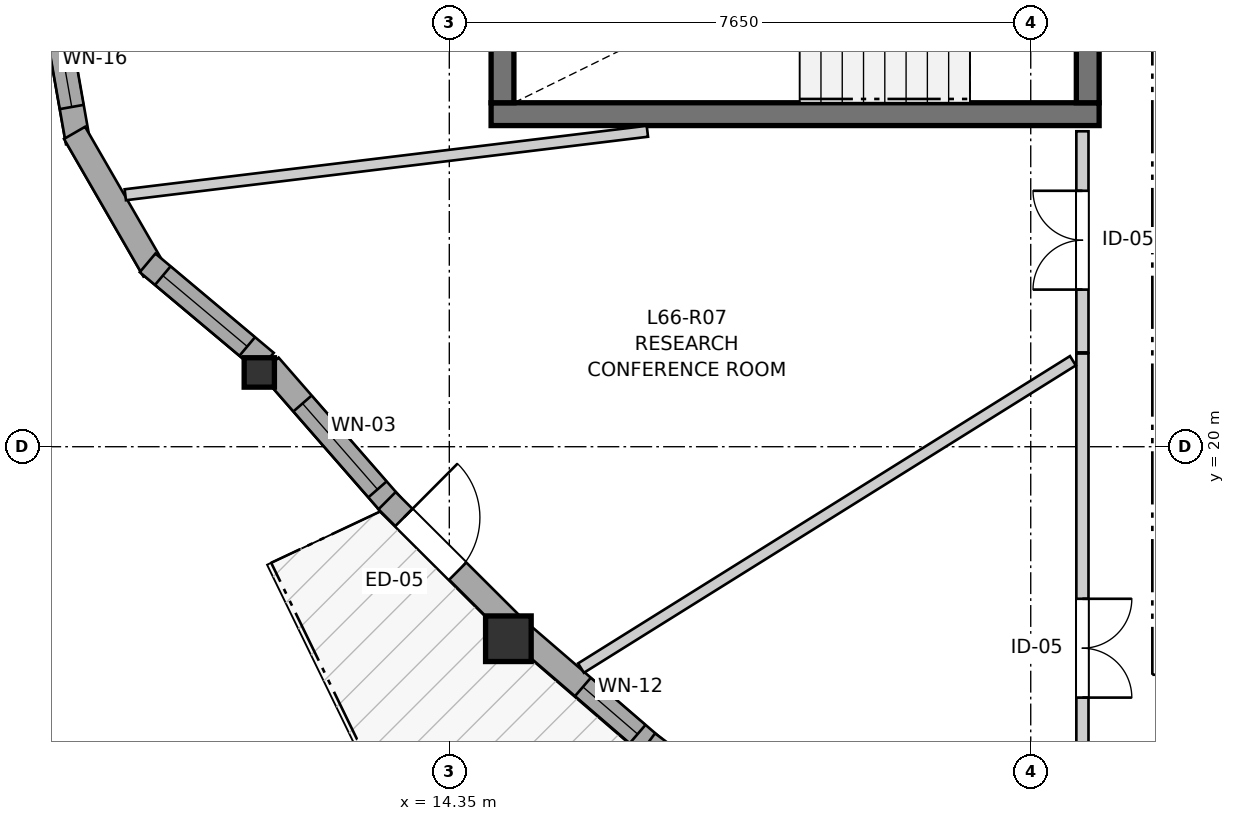
"""IFC4 building model, lengths in metres.
Left out: names, types, materials, properties, quantities, classifications, styles, units other than length and angle.
Written with IfcOpenShell. Run it as: python <this file> out.ifc"""

import sys

from ifc_helpers import new_model, si_unit, direction, frame, frame_2d, origin, origin_2d, place, context, subcontext, project, spatial, rectangle, i_section, extrude, source, transform, mapped, element, fill, save


model = new_model("IFC4")
c1 = context("Model", 3, precision=1e-05, world=origin(), true_north=direction((0.0, 1.0)))
c2 = subcontext(c1, "Body", "Model", "MODEL_VIEW")
j1 = project(units=[si_unit("LENGTHUNIT", "METRE"), si_unit("PLANEANGLEUNIT", "RADIAN")], contexts=[c1])
p1 = place(None, origin())
s1 = spatial("IfcSite", under=j1, at=p1, CompositionType="ELEMENT")
p2 = place(p1, origin())
s2 = spatial("IfcBuilding", under=s1, at=p2, CompositionType="ELEMENT")
p3 = place(p2, frame((0.0, 0.0, 221.2)))
s3 = spatial("IfcBuildingStorey", under=s2, at=p3, CompositionType="ELEMENT", Elevation=221.2)
p4 = place(p3, frame((14.9, 24.375, 0.0), z_axis=(0.0, 0.0, 1.0), x_axis=(1.0, 0.0, 0.0)))
e1 = element("IfcWall", 1, at=p4, inside=s3, PredefinedType="SHEAR", context=c2, shape_type="SweptSolid", body=[
    extrude(rectangle(XDim=8.0, YDim=0.3, at=frame_2d((4.0, 0.0))), origin(), (0.0, 0.0, 1.0), 2.96),
])
p5 = place(p3, frame((15.05, 27.475, 0.0), z_axis=(0.0, 0.0, 1.0), x_axis=(0.0, -1.0, 0.0)))
e2 = element("IfcWall", 2, at=p5, inside=s3, PredefinedType="SHEAR", context=c2, shape_type="SweptSolid", body=[
    extrude(rectangle(XDim=2.95, YDim=0.3, at=frame_2d((1.475, 0.0))), origin(), (0.0, 0.0, 1.0), 2.96),
])
p6 = place(p3, frame((22.75, 24.525, 0.0), z_axis=(0.0, 0.0, 1.0), x_axis=(0.0, 1.0, 0.0)))
e3 = element("IfcWall", 3, at=p6, inside=s3, PredefinedType="SHEAR", context=c2, shape_type="SweptSolid", body=[
    extrude(rectangle(XDim=2.95, YDim=0.3, at=frame_2d((1.475, 0.0))), origin(), (0.0, 0.0, 1.0), 2.96),
])
p7 = place(p6, frame((0.985, 0.0, 0.0)))
e4 = element("IfcOpeningElement", 4, at=p7, cuts=e3, PredefinedType="OPENING", context=c2, shape_type="SweptSolid", body=[
    extrude(rectangle(XDim=0.98, YDim=2.15, at=frame_2d((0.49, 1.075))), frame((0.0, 0.16, 0.0), z_axis=(0.0, -1.0, 0.0), x_axis=(1.0, 0.0, 0.0)), (0.0, 0.0, 1.0), 0.32),
])
m1 = source(origin(), c2, "Body", "SweptSolid", [
    extrude(i_section(OverallWidth=0.398, OverallDepth=0.387, WebThickness=0.019, FlangeThickness=0.03, FilletRadius=0.015, at=origin_2d()), origin(), (0.0, 0.0, 1.0), 2.96),
])
p8 = place(p3, frame((11.85, 20.977, 0.0), z_axis=(0.0, 0.0, 1.0), x_axis=(1.0, 0.0, 0.0)))
e5 = element("IfcColumn", 5, at=p8, inside=s3, PredefinedType="PILASTER", context=c2, shape_type="MappedRepresentation", body=[
    mapped(m1, transform((0.0, 0.0, 0.0), x_axis=(1.0, 0.0, 0.0), y_axis=(0.0, 1.0, 0.0), z_axis=(0.0, 0.0, 1.0), scale=1.0)),
])
m2 = source(origin(), c2, "Body", "SweptSolid", [
    extrude(rectangle(XDim=0.6, YDim=0.6, at=origin_2d()), origin(), (0.0, 0.0, 1.0), 2.96),
])
p9 = place(p3, frame((15.127, 17.474, 0.0), z_axis=(0.0, 0.0, 1.0), x_axis=(1.0, 0.0, 0.0)))
e6 = element("IfcColumn", 6, at=p9, inside=s3, PredefinedType="COLUMN", context=c2, shape_type="MappedRepresentation", body=[
    mapped(m2, transform((0.0, 0.0, 0.0), x_axis=(1.0, 0.0, 0.0), y_axis=(0.0, 1.0, 0.0), z_axis=(0.0, 0.0, 1.0), scale=1.0)),
])
p10 = place(p3, frame((9.101, 26.065, 0.0), z_axis=(0.0, 0.0, 1.0), x_axis=(0.173672066494, -0.984803540469, 0.0)))
e7 = element("IfcWall", 7, at=p10, inside=s3, PredefinedType="SOLIDWALL", context=c2, shape_type="SweptSolid", body=[
    extrude(rectangle(XDim=2.09, YDim=0.32, at=frame_2d((1.045, 0.0))), origin(), (0.0, 0.0, 1.0), 2.58),
])
p11 = place(p10, frame((0.47, 0.0, 0.82)))
e8 = element("IfcOpeningElement", 8, at=p11, cuts=e7, PredefinedType="OPENING", context=c2, shape_type="SweptSolid", body=[
    extrude(rectangle(XDim=1.15, YDim=1.2, at=frame_2d((0.575, 0.6))), frame((0.0, 0.17, 0.0), z_axis=(0.0, -1.0, 0.0), x_axis=(1.0, 0.0, 0.0)), (0.0, 0.0, 1.0), 0.34),
])
p12 = place(p3, frame((9.419, 24.129, 0.0), z_axis=(0.0, 0.0, 1.0), x_axis=(0.499995423472, -0.866028046028, 0.0)))
e9 = element("IfcWall", 9, at=p12, inside=s3, PredefinedType="SOLIDWALL", context=c2, shape_type="SweptSolid", body=[
    extrude(rectangle(XDim=2.09, YDim=0.32, at=frame_2d((1.045, 0.0))), origin(), (0.0, 0.0, 1.0), 2.58),
])
p13 = place(p3, frame((10.381, 22.419, 0.0), z_axis=(0.0, 0.0, 1.0), x_axis=(0.766099948115, -0.642721455608, 0.0)))
e10 = element("IfcWall", 10, at=p13, inside=s3, PredefinedType="SOLIDWALL", context=c2, shape_type="SweptSolid", body=[
    extrude(rectangle(XDim=2.032, YDim=0.32, at=frame_2d((1.016, 0.0))), origin(), (0.0, 0.0, 1.0), 2.58),
])
p14 = place(p13, frame((0.261, 0.0, 0.82)))
e11 = element("IfcOpeningElement", 11, at=p14, cuts=e10, PredefinedType="OPENING", context=c2, shape_type="SweptSolid", body=[
    extrude(rectangle(XDim=1.45, YDim=1.25, at=frame_2d((0.725, 0.625))), frame((0.0, 0.17, 0.0), z_axis=(0.0, -1.0, 0.0), x_axis=(1.0, 0.0, 0.0)), (0.0, 0.0, 1.0), 0.34),
])
p15 = place(p3, frame((11.984, 21.067, 0.0), z_axis=(0.0, 0.0, 1.0), x_axis=(0.657577552216, -0.753386861328, 0.0)))
e12 = element("IfcWall", 12, at=p15, inside=s3, PredefinedType="SOLIDWALL", context=c2, shape_type="SweptSolid", body=[
    extrude(rectangle(XDim=2.444, YDim=0.32, at=frame_2d((1.222, 0.0))), origin(), (0.0, 0.0, 1.0), 2.58),
])
p16 = place(p15, frame((0.662, 0.0, 0.82)))
e13 = element("IfcOpeningElement", 13, at=p16, cuts=e12, PredefinedType="OPENING", context=c2, shape_type="SweptSolid", body=[
    extrude(rectangle(XDim=1.5, YDim=1.45, at=frame_2d((0.75, 0.725))), frame((0.0, 0.17, 0.0), z_axis=(0.0, -1.0, 0.0), x_axis=(1.0, 0.0, 0.0)), (0.0, 0.0, 1.0), 0.34),
])
p17 = place(p3, frame((13.531, 19.29, 0.0), z_axis=(0.0, 0.0, 1.0), x_axis=(0.708419394795, -0.705791726417, 0.0)))
e14 = element("IfcWall", 14, at=p17, inside=s3, PredefinedType="SOLIDWALL", context=c2, shape_type="SweptSolid", body=[
    extrude(rectangle(XDim=2.323, YDim=0.32, at=frame_2d((1.161, 0.0))), origin(), (0.0, 0.0, 1.0), 2.58),
])
p18 = place(p17, frame((0.313, 0.0, 0.0)))
e15 = element("IfcOpeningElement", 15, at=p18, cuts=e14, PredefinedType="OPENING", context=c2, shape_type="SweptSolid", body=[
    extrude(rectangle(XDim=1.0, YDim=2.1, at=frame_2d((0.5, 1.05))), frame((0.0, 0.17, 0.0), z_axis=(0.0, -1.0, 0.0), x_axis=(1.0, 0.0, 0.0)), (0.0, 0.0, 1.0), 0.34),
])
p19 = place(p3, frame((15.3, 17.536, 0.0), z_axis=(0.0, 0.0, 1.0), x_axis=(0.757488333031, -0.652848700177, 0.0)))
e16 = element("IfcWall", 16, at=p19, inside=s3, PredefinedType="SOLIDWALL", context=c2, shape_type="SweptSolid", body=[
    extrude(rectangle(XDim=2.284, YDim=0.32, at=frame_2d((1.142, 0.0))), origin(), (0.0, 0.0, 1.0), 2.58),
])
p20 = place(p19, frame((1.067, 0.0, 0.82)))
e17 = element("IfcOpeningElement", 17, at=p20, cuts=e16, PredefinedType="OPENING", context=c2, shape_type="SweptSolid", body=[
    extrude(rectangle(XDim=0.95, YDim=1.35, at=frame_2d((0.475, 0.675))), frame((0.0, 0.17, 0.0), z_axis=(0.0, -1.0, 0.0), x_axis=(1.0, 0.0, 0.0)), (0.0, 0.0, 1.0), 0.34),
])
p21 = place(p3, frame((16.961, 16.1, 0.0), z_axis=(0.0, 0.0, 1.0), x_axis=(0.803809802043, -0.594886377504, 0.0)))
e18 = element("IfcWall", 18, at=p21, inside=s3, PredefinedType="SOLIDWALL", context=c2, shape_type="SweptSolid", body=[
    extrude(rectangle(XDim=2.328, YDim=0.32, at=frame_2d((1.164, 0.0))), origin(), (0.0, 0.0, 1.0), 2.58),
])
p22 = place(p21, frame((0.649, 0.0, 0.82)))
e19 = element("IfcOpeningElement", 19, at=p22, cuts=e18, PredefinedType="OPENING", context=c2, shape_type="SweptSolid", body=[
    extrude(rectangle(XDim=1.05, YDim=1.45, at=frame_2d((0.525, 0.725))), frame((0.0, 0.17, 0.0), z_axis=(0.0, -1.0, 0.0), x_axis=(1.0, 0.0, 0.0)), (0.0, 0.0, 1.0), 0.34),
])
p23 = place(p3, frame((22.68, 21.226, 0.0), z_axis=(0.0, 0.0, 1.0), x_axis=(0.0, -1.0, 0.0)))
e20 = element("IfcWall", 20, at=p23, inside=s3, PredefinedType="PARTITIONING", context=c2, shape_type="SweptSolid", body=[
    extrude(rectangle(XDim=5.348, YDim=0.16, at=frame_2d((2.674, 0.0))), origin(), (0.0, 0.0, 1.0), 2.96),
])
p24 = place(p23, frame((3.227, 0.0, 0.0)))
e21 = element("IfcOpeningElement", 21, at=p24, cuts=e20, PredefinedType="OPENING", context=c2, shape_type="SweptSolid", body=[
    extrude(rectangle(XDim=1.3, YDim=2.1, at=frame_2d((0.65, 1.05))), frame((0.0, 0.09, 0.0), z_axis=(0.0, -1.0, 0.0), x_axis=(1.0, 0.0, 0.0)), (0.0, 0.0, 1.0), 0.18),
])
p25 = place(p3, frame((22.68, 21.241, 0.0), z_axis=(0.0, 0.0, 1.0), x_axis=(0.0, 1.0, 0.0)))
e22 = element("IfcWall", 22, at=p25, inside=s3, PredefinedType="PARTITIONING", context=c2, shape_type="SweptSolid", body=[
    extrude(rectangle(XDim=2.909, YDim=0.16, at=frame_2d((1.455, 0.0))), origin(), (0.0, 0.0, 1.0), 2.96),
])
p26 = place(p25, frame((0.826, 0.0, 0.0)))
e23 = element("IfcOpeningElement", 23, at=p26, cuts=e22, PredefinedType="OPENING", context=c2, shape_type="SweptSolid", body=[
    extrude(rectangle(XDim=1.3, YDim=2.1, at=frame_2d((0.65, 1.05))), frame((0.0, 0.09, 0.0), z_axis=(0.0, -1.0, 0.0), x_axis=(1.0, 0.0, 0.0)), (0.0, 0.0, 1.0), 0.18),
])
p27 = place(p3, frame((16.083, 17.088, 0.0), z_axis=(0.0, 0.0, 1.0), x_axis=(0.848100737451, 0.529835011239, 0.0)))
e24 = element("IfcWall", 24, at=p27, inside=s3, PredefinedType="PARTITIONING", context=c2, shape_type="SweptSolid", body=[
    extrude(rectangle(XDim=7.631, YDim=0.145, at=frame_2d((3.815, 0.0))), origin(), (0.0, 0.0, 1.0), 1.728),
])
p28 = place(p3, frame((10.087, 23.315, 0.0), z_axis=(0.0, 0.0, 1.0), x_axis=(0.992692853732, 0.120668546642, 0.0)))
e25 = element("IfcWall", 25, at=p28, inside=s3, PredefinedType="PARTITIONING", context=c2, shape_type="SweptSolid", body=[
    extrude(rectangle(XDim=6.919, YDim=0.145, at=frame_2d((3.46, 0.0))), origin(), (0.0, 0.0, 1.0), 2.96),
])
m3 = source(origin(), c2, "Body", "SweptSolid", [
    extrude(rectangle(XDim=1.15, YDim=1.2, at=frame_2d((0.575, 0.6))), frame((0.0, 0.03, 0.0), z_axis=(0.0, -1.0, 0.0), x_axis=(1.0, 0.0, 0.0)), (0.0, 0.0, 1.0), 0.06),
])
p29 = place(p11, origin())
e26 = element("IfcWindow", 26, at=p29, inside=s3, PartitioningType="SINGLE_PANEL", PredefinedType="WINDOW", context=c2, shape_type="MappedRepresentation", body=[
    mapped(m3, transform((0.0, 0.0, 0.0), x_axis=(1.0, 0.0, 0.0), y_axis=(0.0, 1.0, 0.0), z_axis=(0.0, 0.0, 1.0), scale=1.0)),
])
fill(e8, e26)
m4 = source(origin(), c2, "Body", "SweptSolid", [
    extrude(rectangle(XDim=1.45, YDim=1.25, at=frame_2d((0.725, 0.625))), frame((0.0, 0.03, 0.0), z_axis=(0.0, -1.0, 0.0), x_axis=(1.0, 0.0, 0.0)), (0.0, 0.0, 1.0), 0.06),
])
p30 = place(p14, origin())
e27 = element("IfcWindow", 27, at=p30, inside=s3, PartitioningType="SINGLE_PANEL", PredefinedType="WINDOW", context=c2, shape_type="MappedRepresentation", body=[
    mapped(m4, transform((0.0, 0.0, 0.0), x_axis=(1.0, 0.0, 0.0), y_axis=(0.0, 1.0, 0.0), z_axis=(0.0, 0.0, 1.0), scale=1.0)),
])
fill(e11, e27)
m5 = source(origin(), c2, "Body", "SweptSolid", [
    extrude(rectangle(XDim=1.5, YDim=1.45, at=frame_2d((0.75, 0.725))), frame((0.0, 0.03, 0.0), z_axis=(0.0, -1.0, 0.0), x_axis=(1.0, 0.0, 0.0)), (0.0, 0.0, 1.0), 0.06),
])
p31 = place(p16, origin())
e28 = element("IfcWindow", 28, at=p31, inside=s3, PartitioningType="SINGLE_PANEL", PredefinedType="WINDOW", context=c2, shape_type="MappedRepresentation", body=[
    mapped(m5, transform((0.0, 0.0, 0.0), x_axis=(1.0, 0.0, 0.0), y_axis=(0.0, 1.0, 0.0), z_axis=(0.0, 0.0, 1.0), scale=1.0)),
])
fill(e13, e28)
m6 = source(origin(), c2, "Body", "SweptSolid", [
    extrude(rectangle(XDim=0.95, YDim=1.35, at=frame_2d((0.475, 0.675))), frame((0.0, 0.03, 0.0), z_axis=(0.0, -1.0, 0.0), x_axis=(1.0, 0.0, 0.0)), (0.0, 0.0, 1.0), 0.06),
])
p32 = place(p20, origin())
e29 = element("IfcWindow", 29, at=p32, inside=s3, PartitioningType="SINGLE_PANEL", PredefinedType="WINDOW", context=c2, shape_type="MappedRepresentation", body=[
    mapped(m6, transform((0.0, 0.0, 0.0), x_axis=(1.0, 0.0, 0.0), y_axis=(0.0, 1.0, 0.0), z_axis=(0.0, 0.0, 1.0), scale=1.0)),
])
fill(e17, e29)
m7 = source(origin(), c2, "Body", "SweptSolid", [
    extrude(rectangle(XDim=1.0, YDim=2.1, at=frame_2d((0.5, 1.05))), frame((0.0, 0.025, 0.0), z_axis=(0.0, -1.0, 0.0), x_axis=(1.0, 0.0, 0.0)), (0.0, 0.0, 1.0), 0.05),
])
p33 = place(p18, origin())
e30 = element("IfcDoor", 30, at=p33, inside=s3, OperationType="SINGLE_SWING_LEFT", PredefinedType="DOOR", context=c2, shape_type="MappedRepresentation", body=[
    mapped(m7, transform((0.0, 0.0, 0.0), x_axis=(1.0, 0.0, 0.0), y_axis=(0.0, 1.0, 0.0), z_axis=(0.0, 0.0, 1.0), scale=1.0)),
])
fill(e15, e30)
m8 = source(origin(), c2, "Body", "SweptSolid", [
    extrude(rectangle(XDim=1.3, YDim=2.1, at=frame_2d((0.65, 1.05))), frame((0.0, 0.025, 0.0), z_axis=(0.0, -1.0, 0.0), x_axis=(1.0, 0.0, 0.0)), (0.0, 0.0, 1.0), 0.05),
])
p34 = place(p24, origin())
e31 = element("IfcDoor", 31, at=p34, inside=s3, OperationType="DOUBLE_DOOR_SINGLE_SWING", PredefinedType="DOOR", context=c2, shape_type="MappedRepresentation", body=[
    mapped(m8, transform((0.0, 0.0, 0.0), x_axis=(1.0, 0.0, 0.0), y_axis=(0.0, 1.0, 0.0), z_axis=(0.0, 0.0, 1.0), scale=1.0)),
])
fill(e21, e31)
p35 = place(p26, origin())
e32 = element("IfcDoor", 32, at=p35, inside=s3, OperationType="DOUBLE_DOOR_SINGLE_SWING", PredefinedType="DOOR", context=c2, shape_type="MappedRepresentation", body=[
    mapped(m8, transform((0.0, 0.0, 0.0), x_axis=(1.0, 0.0, 0.0), y_axis=(0.0, 1.0, 0.0), z_axis=(0.0, 0.0, 1.0), scale=1.0)),
])
fill(e23, e32)
save(model, sys.argv[1])
